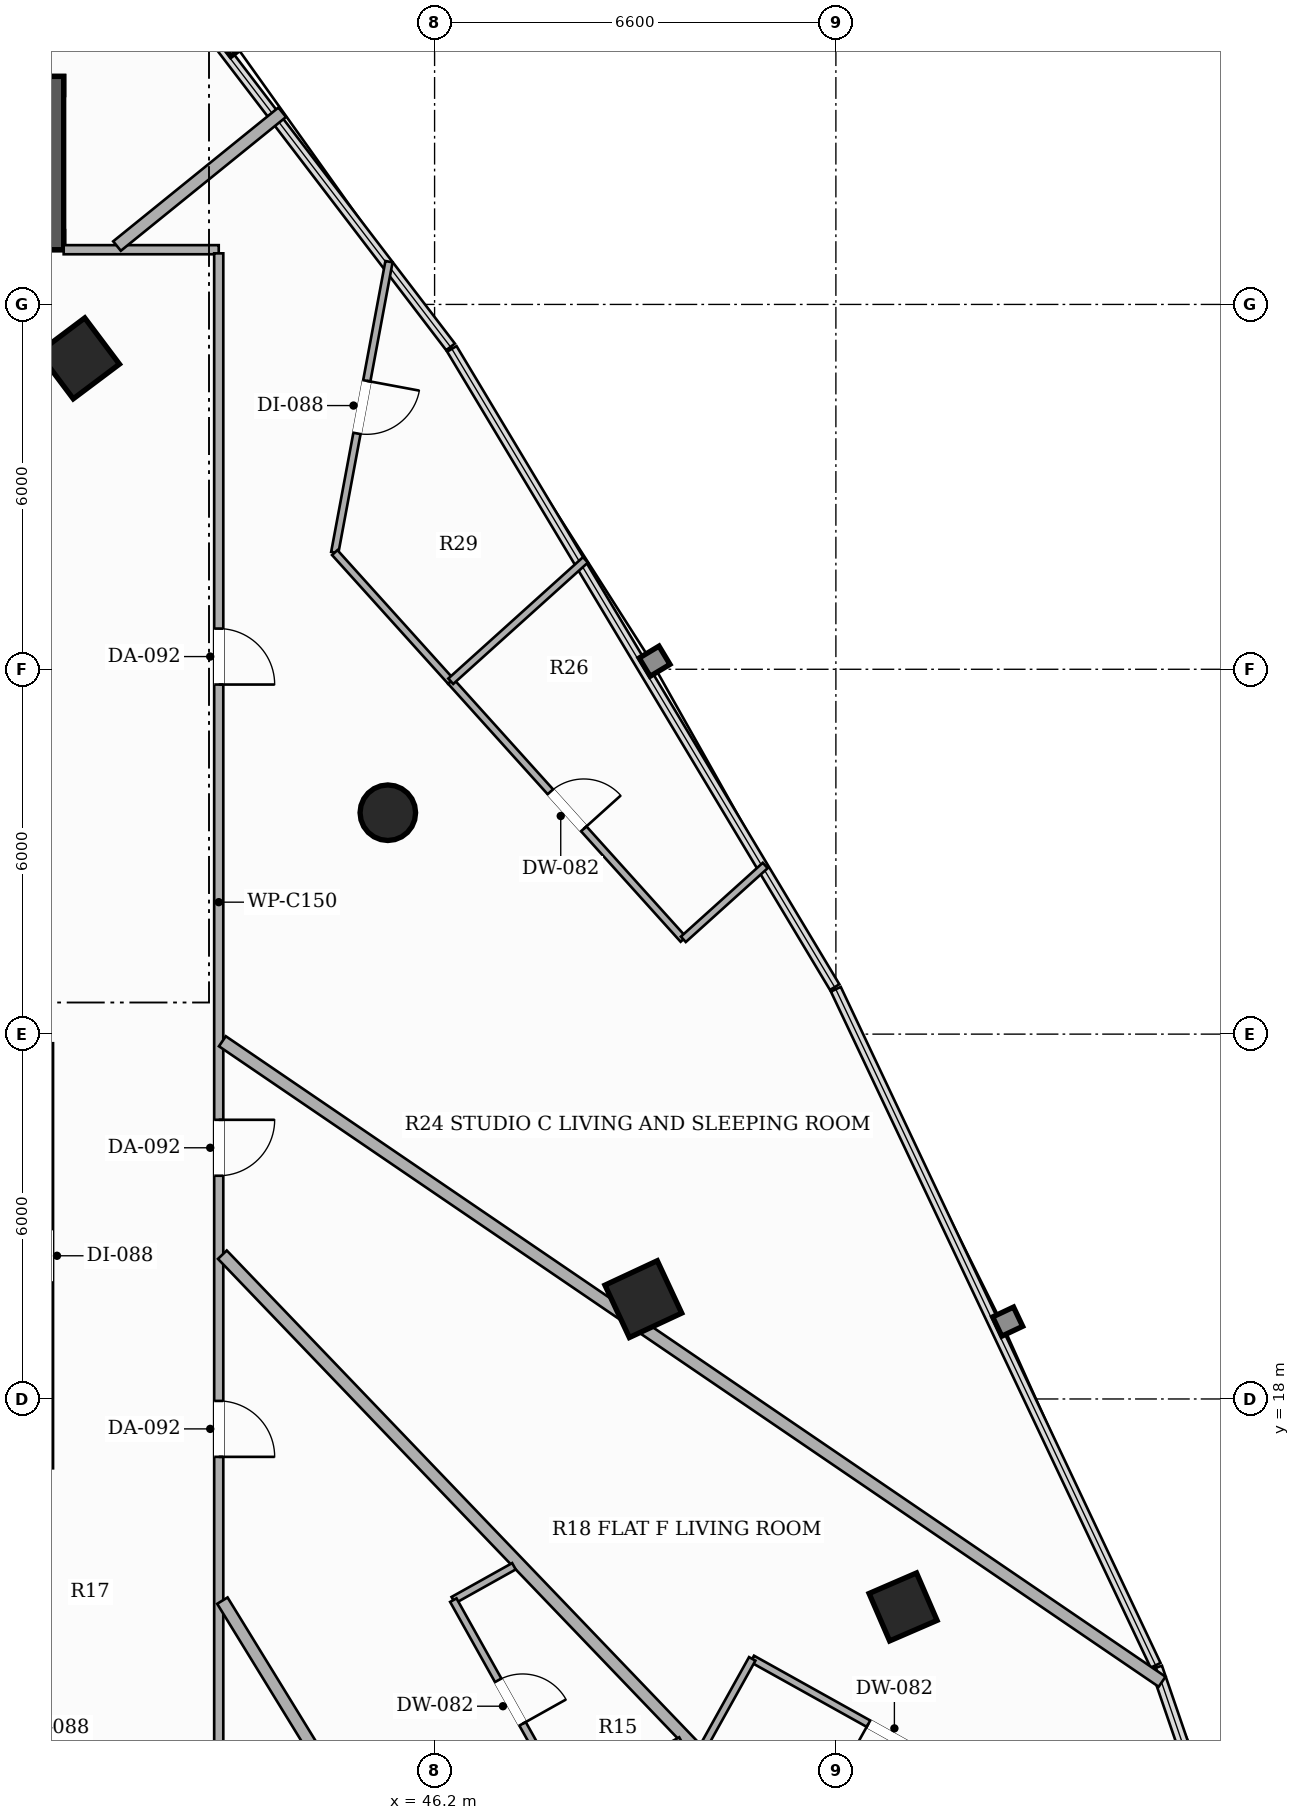
"""IFC4 building model, lengths in metres.
Left out: names, types, materials, properties, quantities, classifications, styles, units other than length and angle.
Written with IfcOpenShell. Run it as: python <this file> out.ifc"""

import sys

from ifc_helpers import new_model, si_unit, direction, frame, frame_2d, origin, origin_2d, place, context, subcontext, project, spatial, rectangle, hollow_rectangle, hollow_circle, extrude, element, fill, save


model = new_model("IFC4")
c1 = context("Model", 3, precision=1e-05, world=origin(), true_north=direction((0.0, 1.0)))
c2 = subcontext(c1, "Body", "Model", "MODEL_VIEW")
j1 = project(units=[si_unit("LENGTHUNIT", "METRE"), si_unit("PLANEANGLEUNIT", "RADIAN")], contexts=[c1])
p1 = place(None, origin())
s1 = spatial("IfcSite", under=j1, at=p1, CompositionType="ELEMENT")
p2 = place(p1, origin())
s2 = spatial("IfcBuilding", under=s1, at=p2, CompositionType="ELEMENT")
p3 = place(p2, frame((0.0, 0.0, 74.15)))
s3 = spatial("IfcBuildingStorey", under=s2, at=p3, CompositionType="ELEMENT", Elevation=74.15)
p4 = place(p3, frame((40.1, 37.05, 0.0), z_axis=(0.0, 0.0, 1.0), x_axis=(-1.0, 0.0, 0.0)))
e1 = element("IfcWall", 1, at=p4, inside=s3, PredefinedType="SHEAR", context=c2, shape_type="SweptSolid", body=[
    extrude(rectangle(XDim=14.2, YDim=0.3, at=frame_2d((7.1, 0.0))), origin(), (0.0, 0.0, 1.0), 3.3),
])
p5 = place(p4, frame((12.325, 0.0, 0.0)))
e2 = element("IfcOpeningElement", 2, at=p5, cuts=e1, PredefinedType="OPENING", context=c2, shape_type="SweptSolid", body=[
    extrude(rectangle(XDim=1.1, YDim=2.2, at=frame_2d((0.55, 1.1))), frame((0.0, 0.16, 0.0), z_axis=(0.0, -1.0, 0.0), x_axis=(1.0, 0.0, 0.0)), (0.0, 0.0, 1.0), 0.32),
])
p6 = place(p4, frame((0.775, 0.0, 0.0)))
e3 = element("IfcOpeningElement", 3, at=p6, cuts=e1, PredefinedType="OPENING", context=c2, shape_type="SweptSolid", body=[
    extrude(rectangle(XDim=1.1, YDim=2.2, at=frame_2d((0.55, 1.1))), frame((0.0, 0.16, 0.0), z_axis=(0.0, -1.0, 0.0), x_axis=(1.0, 0.0, 0.0)), (0.0, 0.0, 1.0), 0.32),
])
p7 = place(p3, frame((25.9, 39.6, 0.0), z_axis=(0.0, 0.0, 1.0), x_axis=(1.0, 0.0, 0.0)))
e4 = element("IfcWall", 4, at=p7, inside=s3, PredefinedType="SHEAR", context=c2, shape_type="SweptSolid", body=[
    extrude(rectangle(XDim=14.2, YDim=0.3, at=frame_2d((7.1, 0.0))), origin(), (0.0, 0.0, 1.0), 3.3),
])
p8 = place(p3, frame((39.95, 36.9, 0.0), z_axis=(0.0, 0.0, 1.0), x_axis=(0.0, 1.0, 0.0)))
e5 = element("IfcWall", 5, at=p8, inside=s3, PredefinedType="SHEAR", context=c2, shape_type="SweptSolid", body=[
    extrude(rectangle(XDim=2.85, YDim=0.3, at=frame_2d((1.425, 0.0))), origin(), (0.0, 0.0, 1.0), 3.3),
])
p9 = place(p3, frame((49.633, 19.642, 0.0), z_axis=(0.0, 0.0, 1.0), x_axis=(-0.422618261741, 0.906307787037, 0.0)))
e6 = element("IfcColumn", 6, at=p9, inside=s3, PredefinedType="COLUMN", context=c2, shape_type="SweptSolid", body=[
    extrude(hollow_rectangle(XDim=0.95, YDim=0.95, WallThickness=0.032, at=origin_2d()), origin(), (0.0, 0.0, 1.0), 3.3),
])
p10 = place(p3, frame((45.431, 27.641, 0.0), z_axis=(0.0, 0.0, 1.0), x_axis=(1.0, 0.0, 0.0)))
e7 = element("IfcColumn", 7, at=p10, inside=s3, PredefinedType="COLUMN", context=c2, shape_type="SweptSolid", body=[
    extrude(hollow_circle(Radius=0.457, WallThickness=0.025, at=origin_2d()), origin(), (0.0, 0.0, 1.0), 3.3),
])
p11 = place(p3, frame((40.352, 35.113, 0.0), z_axis=(0.0, 0.0, 1.0), x_axis=(-0.600420225326, 0.799684658487, 0.0)))
e8 = element("IfcColumn", 8, at=p11, inside=s3, PredefinedType="COLUMN", context=c2, shape_type="SweptSolid", body=[
    extrude(hollow_rectangle(XDim=0.95, YDim=0.95, WallThickness=0.032, at=origin_2d()), origin(), (0.0, 0.0, 1.0), 3.3),
])
p12 = place(p3, frame((53.905, 14.58, 0.0), z_axis=(0.0, 0.0, 1.0), x_axis=(-0.397147890635, 0.917754625684, 0.0)))
e9 = element("IfcColumn", 9, at=p12, inside=s3, PredefinedType="COLUMN", context=c2, shape_type="SweptSolid", body=[
    extrude(hollow_rectangle(XDim=0.85, YDim=0.85, WallThickness=0.028, at=origin_2d()), origin(), (0.0, 0.0, 1.0), 3.3),
])
p13 = place(p3, frame((40.1, 36.9, 0.0), z_axis=(0.0, 0.0, 1.0), x_axis=(1.0, 0.0, 0.0)))
e10 = element("IfcWall", 10, at=p13, inside=s3, PredefinedType="PARTITIONING", context=c2, shape_type="SweptSolid", body=[
    extrude(rectangle(XDim=2.55, YDim=0.15, at=frame_2d((1.275, 0.0))), origin(), (0.0, 0.0, 1.0), 2.413),
])
p14 = place(p3, frame((42.65, 36.84, 0.0), z_axis=(0.0, 0.0, 1.0), x_axis=(0.0, -1.0, 0.0)))
e11 = element("IfcWall", 11, at=p14, inside=s3, PredefinedType="PARTITIONING", context=c2, shape_type="SweptSolid", body=[
    extrude(rectangle(XDim=25.04, YDim=0.15, at=frame_2d((12.52, 0.0))), origin(), (0.0, 0.0, 1.0), 2.413),
])
p15 = place(p14, frame((6.171, 0.0, 0.0)))
e12 = element("IfcOpeningElement", 12, at=p15, cuts=e11, PredefinedType="OPENING", context=c2, shape_type="SweptSolid", body=[
    extrude(rectangle(XDim=0.92, YDim=2.15, at=frame_2d((0.46, 1.075))), frame((0.0, 0.085, 0.0), z_axis=(0.0, -1.0, 0.0), x_axis=(1.0, 0.0, 0.0)), (0.0, 0.0, 1.0), 0.17),
])
p16 = place(p14, frame((14.249, 0.0, 0.0)))
e13 = element("IfcOpeningElement", 13, at=p16, cuts=e11, PredefinedType="OPENING", context=c2, shape_type="SweptSolid", body=[
    extrude(rectangle(XDim=0.92, YDim=2.15, at=frame_2d((0.46, 1.075))), frame((0.0, 0.085, 0.0), z_axis=(0.0, -1.0, 0.0), x_axis=(1.0, 0.0, 0.0)), (0.0, 0.0, 1.0), 0.17),
])
p17 = place(p14, frame((18.872, 0.0, 0.0)))
e14 = element("IfcOpeningElement", 14, at=p17, cuts=e11, PredefinedType="OPENING", context=c2, shape_type="SweptSolid", body=[
    extrude(rectangle(XDim=0.92, YDim=2.15, at=frame_2d((0.46, 1.075))), frame((0.0, 0.085, 0.0), z_axis=(0.0, -1.0, 0.0), x_axis=(1.0, 0.0, 0.0)), (0.0, 0.0, 1.0), 0.17),
])
p18 = place(p3, frame((39.85, 16.86, 0.0), z_axis=(0.0, 0.0, 1.0), x_axis=(0.0, 1.0, 0.0)))
e15 = element("IfcWall", 15, at=p18, inside=s3, PredefinedType="PARTITIONING", context=c2, shape_type="SweptSolid", body=[
    extrude(rectangle(XDim=6.99, YDim=0.15, at=frame_2d((3.495, 0.0))), origin(), (0.0, 0.0, 1.0), 2.669),
])
p19 = place(p18, frame((3.055, 0.0, 0.0)))
e16 = element("IfcOpeningElement", 16, at=p19, cuts=e15, PredefinedType="OPENING", context=c2, shape_type="SweptSolid", body=[
    extrude(rectangle(XDim=0.88, YDim=2.1, at=frame_2d((0.44, 1.05))), frame((0.0, 0.085, 0.0), z_axis=(0.0, -1.0, 0.0), x_axis=(1.0, 0.0, 0.0)), (0.0, 0.0, 1.0), 0.17),
])
p20 = place(p3, frame((43.694, 39.16, 0.0), z_axis=(0.0, 0.0, 1.0), x_axis=(-0.777183068613, -0.629274564765, 0.0)))
e17 = element("IfcWall", 17, at=p20, inside=s3, PredefinedType="PARTITIONING", context=c2, shape_type="SweptSolid", body=[
    extrude(rectangle(XDim=3.496, YDim=0.2, at=frame_2d((1.748, 0.0))), origin(), (0.0, 0.0, 1.0), 3.06),
])
p21 = place(p3, frame((58.165, 13.35, 0.0), z_axis=(0.0, 0.0, 1.0), x_axis=(-0.826341659386, 0.563169123766, 0.0)))
e18 = element("IfcWall", 18, at=p21, inside=s3, PredefinedType="PARTITIONING", context=c2, shape_type="SweptSolid", body=[
    extrude(rectangle(XDim=18.703, YDim=0.2, at=frame_2d((9.352, 0.0))), origin(), (0.0, 0.0, 1.0), 2.413),
])
p22 = place(p3, frame((58.237, 4.179, 0.0), z_axis=(0.0, 0.0, 1.0), x_axis=(-0.69208567792, 0.721815360337, 0.0)))
e19 = element("IfcWall", 19, at=p22, inside=s3, PredefinedType="PARTITIONING", context=c2, shape_type="SweptSolid", body=[
    extrude(rectangle(XDim=22.435, YDim=0.2, at=frame_2d((11.218, 0.0))), origin(), (0.0, 0.0, 1.0), 2.413),
])
p23 = place(p3, frame((49.827, 3.09, 0.0), z_axis=(0.0, 0.0, 1.0), x_axis=(-0.523146880199, 0.852242536921, 0.0)))
e20 = element("IfcWall", 20, at=p23, inside=s3, PredefinedType="PARTITIONING", context=c2, shape_type="SweptSolid", body=[
    extrude(rectangle(XDim=13.604, YDim=0.2, at=frame_2d((6.802, 0.0))), origin(), (0.0, 0.0, 1.0), 2.413),
])
p24 = place(p3, frame((46.466, 29.803, 0.0), z_axis=(0.0, 0.0, 1.0), x_axis=(0.669491047861, -0.742820124144, 0.0)))
e21 = element("IfcWall", 21, at=p24, inside=s3, PredefinedType="PARTITIONING", context=c2, shape_type="SweptSolid", body=[
    extrude(rectangle(XDim=5.713, YDim=0.12, at=frame_2d((2.856, 0.0))), origin(), (0.0, 0.0, 1.0), 3.06),
])
p25 = place(p24, frame((2.447, 0.0, 0.0)))
e22 = element("IfcOpeningElement", 22, at=p25, cuts=e21, PredefinedType="OPENING", context=c2, shape_type="SweptSolid", body=[
    extrude(rectangle(XDim=0.82, YDim=2.1, at=frame_2d((0.41, 1.05))), frame((0.0, 0.07, 0.0), z_axis=(0.0, -1.0, 0.0), x_axis=(1.0, 0.0, 0.0)), (0.0, 0.0, 1.0), 0.14),
])
p26 = place(p3, frame((50.291, 25.559, 0.0), z_axis=(0.0, 0.0, 1.0), x_axis=(0.742845405041, 0.669462996894, 0.0)))
e23 = element("IfcWall", 23, at=p26, inside=s3, PredefinedType="PARTITIONING", context=c2, shape_type="SweptSolid", body=[
    extrude(rectangle(XDim=1.813, YDim=0.12, at=frame_2d((0.907, 0.0))), origin(), (0.0, 0.0, 1.0), 3.06),
])
p27 = place(p3, frame((45.45, 36.703, 0.0), z_axis=(0.0, 0.0, 1.0), x_axis=(-0.183267636936, -0.9830630566, 0.0)))
e24 = element("IfcWall", 24, at=p27, inside=s3, PredefinedType="PARTITIONING", context=c2, shape_type="SweptSolid", body=[
    extrude(rectangle(XDim=4.866, YDim=0.12, at=frame_2d((2.433, 0.0))), origin(), (0.0, 0.0, 1.0), 3.06),
])
p28 = place(p27, frame((1.993, 0.0, 0.0)))
e25 = element("IfcOpeningElement", 25, at=p28, cuts=e24, PredefinedType="OPENING", context=c2, shape_type="SweptSolid", body=[
    extrude(rectangle(XDim=0.88, YDim=2.1, at=frame_2d((0.44, 1.05))), frame((0.0, 0.07, 0.0), z_axis=(0.0, -1.0, 0.0), x_axis=(1.0, 0.0, 0.0)), (0.0, 0.0, 1.0), 0.14),
])
p29 = place(p3, frame((44.558, 31.919, 0.0), z_axis=(0.0, 0.0, 1.0), x_axis=(0.669660366513, -0.742667485165, 0.0)))
e26 = element("IfcWall", 26, at=p29, inside=s3, PredefinedType="PARTITIONING", context=c2, shape_type="SweptSolid", body=[
    extrude(rectangle(XDim=2.849, YDim=0.12, at=frame_2d((1.425, 0.0))), origin(), (0.0, 0.0, 1.0), 3.06),
])
p30 = place(p3, frame((46.466, 29.803, 0.0), z_axis=(0.0, 0.0, 1.0), x_axis=(0.742837964983, 0.669471252392, 0.0)))
e27 = element("IfcWall", 27, at=p30, inside=s3, PredefinedType="PARTITIONING", context=c2, shape_type="SweptSolid", body=[
    extrude(rectangle(XDim=2.982, YDim=0.12, at=frame_2d((1.491, 0.0))), origin(), (0.0, 0.0, 1.0), 3.06),
])
p31 = place(p3, frame((54.847, 11.818, 0.0), z_axis=(0.0, 0.0, 1.0), x_axis=(-0.87346578699, 0.486885529624, 0.0)))
e28 = element("IfcWall", 28, at=p31, inside=s3, PredefinedType="PARTITIONING", context=c2, shape_type="SweptSolid", body=[
    extrude(rectangle(XDim=3.919, YDim=0.12, at=frame_2d((1.959, 0.0))), origin(), (0.0, 0.0, 1.0), 2.413),
])
p32 = place(p31, frame((0.91, 0.0, 0.0)))
e29 = element("IfcOpeningElement", 29, at=p32, cuts=e28, PredefinedType="OPENING", context=c2, shape_type="SweptSolid", body=[
    extrude(rectangle(XDim=0.82, YDim=2.1, at=frame_2d((0.41, 1.05))), frame((0.0, 0.07, 0.0), z_axis=(0.0, -1.0, 0.0), x_axis=(1.0, 0.0, 0.0)), (0.0, 0.0, 1.0), 0.14),
])
p33 = place(p3, frame((51.424, 13.726, 0.0), z_axis=(0.0, 0.0, 1.0), x_axis=(-0.486605473044, -0.873621836726, 0.0)))
e30 = element("IfcWall", 30, at=p33, inside=s3, PredefinedType="PARTITIONING", context=c2, shape_type="SweptSolid", body=[
    extrude(rectangle(XDim=1.679, YDim=0.12, at=frame_2d((0.84, 0.0))), origin(), (0.0, 0.0, 1.0), 2.413),
])
p34 = place(p3, frame((47.505, 15.249, 0.0), z_axis=(0.0, 0.0, 1.0), x_axis=(-0.872914025969, -0.487874064967, 0.0)))
e31 = element("IfcWall", 31, at=p34, inside=s3, PredefinedType="PARTITIONING", context=c2, shape_type="SweptSolid", body=[
    extrude(rectangle(XDim=1.142, YDim=0.12, at=frame_2d((0.571, 0.0))), origin(), (0.0, 0.0, 1.0), 3.06),
])
p35 = place(p3, frame((46.508, 14.692, 0.0), z_axis=(0.0, 0.0, 1.0), x_axis=(0.488483407483, -0.872573183529, 0.0)))
e32 = element("IfcWall", 32, at=p35, inside=s3, PredefinedType="PARTITIONING", context=c2, shape_type="SweptSolid", body=[
    extrude(rectangle(XDim=3.843, YDim=0.12, at=frame_2d((1.921, 0.0))), origin(), (0.0, 0.0, 1.0), 3.06),
])
p36 = place(p35, frame((1.511, 0.0, 0.0)))
e33 = element("IfcOpeningElement", 33, at=p36, cuts=e32, PredefinedType="OPENING", context=c2, shape_type="SweptSolid", body=[
    extrude(rectangle(XDim=0.82, YDim=2.1, at=frame_2d((0.41, 1.05))), frame((0.0, 0.07, 0.0), z_axis=(0.0, -1.0, 0.0), x_axis=(1.0, 0.0, 0.0)), (0.0, 0.0, 1.0), 0.14),
])
p37 = place(p3, frame((48.385, 11.339, 0.0), z_axis=(0.0, 0.0, 1.0), x_axis=(0.872618854318, 0.488401817246, 0.0)))
e34 = element("IfcWall", 34, at=p37, inside=s3, PredefinedType="PARTITIONING", context=c2, shape_type="SweptSolid", body=[
    extrude(rectangle(XDim=2.139, YDim=0.12, at=frame_2d((1.07, 0.0))), origin(), (0.0, 0.0, 1.0), 2.413),
])
p38 = place(p15, origin())
e35 = element("IfcDoor", 35, at=p38, inside=s3, OperationType="SINGLE_SWING_RIGHT", PredefinedType="DOOR", context=c2, shape_type="SweptSolid", body=[
    extrude(rectangle(XDim=0.92, YDim=2.15, at=frame_2d((0.46, 1.075))), frame((0.0, 0.025, 0.0), z_axis=(0.0, -1.0, 0.0), x_axis=(1.0, 0.0, 0.0)), (0.0, 0.0, 1.0), 0.05),
])
fill(e12, e35)
p39 = place(p25, origin())
e36 = element("IfcDoor", 36, at=p39, inside=s3, OperationType="SINGLE_SWING_RIGHT", PredefinedType="DOOR", context=c2, shape_type="SweptSolid", body=[
    extrude(rectangle(XDim=0.82, YDim=2.1, at=frame_2d((0.41, 1.05))), frame((0.0, 0.025, 0.0), z_axis=(0.0, -1.0, 0.0), x_axis=(1.0, 0.0, 0.0)), (0.0, 0.0, 1.0), 0.05),
])
fill(e22, e36)
p40 = place(p28, origin())
e37 = element("IfcDoor", 37, at=p40, inside=s3, OperationType="SINGLE_SWING_LEFT", PredefinedType="DOOR", context=c2, shape_type="SweptSolid", body=[
    extrude(rectangle(XDim=0.88, YDim=2.1, at=frame_2d((0.44, 1.05))), frame((0.0, 0.025, 0.0), z_axis=(0.0, -1.0, 0.0), x_axis=(1.0, 0.0, 0.0)), (0.0, 0.0, 1.0), 0.05),
])
fill(e25, e37)
p41 = place(p16, origin())
e38 = element("IfcDoor", 38, at=p41, inside=s3, OperationType="SINGLE_SWING_LEFT", PredefinedType="DOOR", context=c2, shape_type="SweptSolid", body=[
    extrude(rectangle(XDim=0.92, YDim=2.15, at=frame_2d((0.46, 1.075))), frame((0.0, 0.025, 0.0), z_axis=(0.0, -1.0, 0.0), x_axis=(1.0, 0.0, 0.0)), (0.0, 0.0, 1.0), 0.05),
])
fill(e13, e38)
p42 = place(p32, origin())
e39 = element("IfcDoor", 39, at=p42, inside=s3, OperationType="SINGLE_SWING_RIGHT", PredefinedType="DOOR", context=c2, shape_type="SweptSolid", body=[
    extrude(rectangle(XDim=0.82, YDim=2.1, at=frame_2d((0.41, 1.05))), frame((0.0, 0.025, 0.0), z_axis=(0.0, -1.0, 0.0), x_axis=(1.0, 0.0, 0.0)), (0.0, 0.0, 1.0), 0.05),
])
fill(e29, e39)
p43 = place(p17, origin())
e40 = element("IfcDoor", 40, at=p43, inside=s3, OperationType="SINGLE_SWING_RIGHT", PredefinedType="DOOR", context=c2, shape_type="SweptSolid", body=[
    extrude(rectangle(XDim=0.92, YDim=2.15, at=frame_2d((0.46, 1.075))), frame((0.0, 0.025, 0.0), z_axis=(0.0, -1.0, 0.0), x_axis=(1.0, 0.0, 0.0)), (0.0, 0.0, 1.0), 0.05),
])
fill(e14, e40)
p44 = place(p36, origin())
e41 = element("IfcDoor", 41, at=p44, inside=s3, OperationType="SINGLE_SWING_RIGHT", PredefinedType="DOOR", context=c2, shape_type="SweptSolid", body=[
    extrude(rectangle(XDim=0.82, YDim=2.1, at=frame_2d((0.41, 1.05))), frame((0.0, 0.025, 0.0), z_axis=(0.0, -1.0, 0.0), x_axis=(1.0, 0.0, 0.0)), (0.0, 0.0, 1.0), 0.05),
])
fill(e33, e41)
save(model, sys.argv[1])
